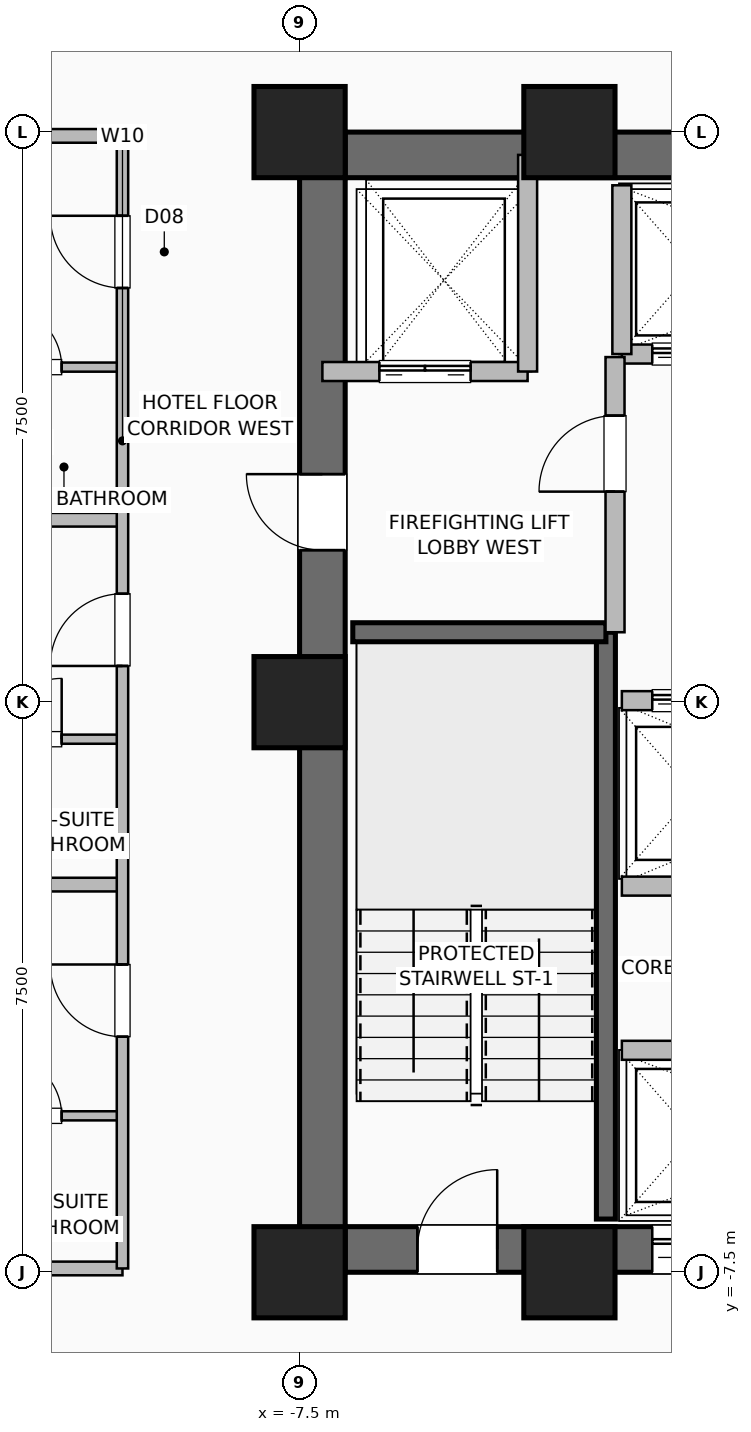
"""IFC4 building model, lengths in metres.
Left out: names, types, materials, properties, quantities, classifications, styles, units other than length and angle.
Written with IfcOpenShell. Run it as: python <this file> out.ifc"""

import sys

from ifc_helpers import new_model, si_unit, direction, frame, frame_2d, origin, origin_2d, place, context, subcontext, project, spatial, rectangle, hollow_rectangle, extrude, element, fill, save


model = new_model("IFC4")
c1 = context("Model", 3, precision=1e-05, world=origin(), true_north=direction((0.0, 1.0)))
c2 = subcontext(c1, "Body", "Model", "MODEL_VIEW")
j1 = project(units=[si_unit("LENGTHUNIT", "METRE"), si_unit("PLANEANGLEUNIT", "RADIAN")], contexts=[c1])
p1 = place(None, origin())
s1 = spatial("IfcSite", under=j1, at=p1, CompositionType="ELEMENT")
p2 = place(p1, origin())
s2 = spatial("IfcBuilding", under=s1, at=p2, CompositionType="ELEMENT")
p3 = place(p2, frame((0.0, 0.0, 30.5)))
s3 = spatial("IfcBuildingStorey", under=s2, at=p3, CompositionType="ELEMENT", Elevation=30.5)
for number, where, z_axis, x_axis in (
    (1, (-7.5, -7.5, 0.0), (0.0, 0.0, 1.0), (1.0, 0.0, 0.0)),
    (2, (-3.95, -7.5, 0.0), (0.0, 0.0, 1.0), (1.0, 0.0, 0.0)),
    (3, (-3.95, 7.5, 0.0), (0.0, 0.0, 1.0), (1.0, 0.0, 0.0)),
    (4, (-7.5, 7.5, 0.0), (0.0, 0.0, 1.0), (1.0, 0.0, 0.0)),
    (5, (-7.5, 0.0, 0.0), (0.0, 0.0, 1.0), (1.0, 0.0, 0.0)),
):
    element("IfcColumn", number, at=place(p3, frame(where, z_axis=z_axis, x_axis=x_axis)), inside=s3, PredefinedType="COLUMN", context=c2, shape_type="SweptSolid", body=[
        extrude(hollow_rectangle(XDim=1.2, YDim=1.2, WallThickness=0.055, at=origin_2d()), origin(), (0.0, 0.0, 1.0), 3.5),
    ])
p4 = place(p3, frame((-7.5, -7.2, 0.0), z_axis=(0.0, 0.0, 1.0), x_axis=(1.0, 0.0, 0.0)))
e6 = element("IfcWall", 6, at=p4, inside=s3, PredefinedType="SHEAR", context=c2, shape_type="SweptSolid", body=[
    extrude(rectangle(XDim=15.0, YDim=0.6, at=frame_2d((7.5, 0.0))), origin(), (0.0, 0.0, 1.0), 3.25),
])
p5 = place(p4, frame((1.55, 0.0, 0.0)))
e7 = element("IfcOpeningElement", 7, at=p5, cuts=e6, PredefinedType="OPENING", context=c2, shape_type="SweptSolid", body=[
    extrude(rectangle(XDim=1.05, YDim=2.08, at=frame_2d((0.525, 1.04))), frame((0.0, 0.31, 0.0), z_axis=(0.0, -1.0, 0.0), x_axis=(1.0, 0.0, 0.0)), (0.0, 0.0, 1.0), 0.62),
])
p6 = place(p4, frame((12.4, 0.0, 0.0)))
e8 = element("IfcOpeningElement", 8, at=p6, cuts=e6, PredefinedType="OPENING", context=c2, shape_type="SweptSolid", body=[
    extrude(rectangle(XDim=1.05, YDim=2.08, at=frame_2d((0.525, 1.04))), frame((0.0, 0.31, 0.0), z_axis=(0.0, -1.0, 0.0), x_axis=(1.0, 0.0, 0.0)), (0.0, 0.0, 1.0), 0.62),
])
p7 = place(p4, frame((4.64, 0.0, 0.0)))
e9 = element("IfcOpeningElement", 9, at=p7, cuts=e6, PredefinedType="OPENING", context=c2, shape_type="SweptSolid", body=[
    extrude(rectangle(XDim=1.1, YDim=2.2, at=frame_2d((0.55, 1.1))), frame((0.0, 0.31, 0.0), z_axis=(0.0, -1.0, 0.0), x_axis=(1.0, 0.0, 0.0)), (0.0, 0.0, 1.0), 0.62),
])
p8 = place(p4, frame((6.52, 0.0, 0.0)))
e10 = element("IfcOpeningElement", 10, at=p8, cuts=e6, PredefinedType="OPENING", context=c2, shape_type="SweptSolid", body=[
    extrude(rectangle(XDim=1.1, YDim=2.2, at=frame_2d((0.55, 1.1))), frame((0.0, 0.31, 0.0), z_axis=(0.0, -1.0, 0.0), x_axis=(1.0, 0.0, 0.0)), (0.0, 0.0, 1.0), 0.62),
])
p9 = place(p4, frame((8.4, 0.0, 0.0)))
e11 = element("IfcOpeningElement", 11, at=p9, cuts=e6, PredefinedType="OPENING", context=c2, shape_type="SweptSolid", body=[
    extrude(rectangle(XDim=1.1, YDim=2.2, at=frame_2d((0.55, 1.1))), frame((0.0, 0.31, 0.0), z_axis=(0.0, -1.0, 0.0), x_axis=(1.0, 0.0, 0.0)), (0.0, 0.0, 1.0), 0.62),
])
p10 = place(p3, frame((-7.5, 7.2, 0.0), z_axis=(0.0, 0.0, 1.0), x_axis=(1.0, 0.0, 0.0)))
e12 = element("IfcWall", 12, at=p10, inside=s3, PredefinedType="SHEAR", context=c2, shape_type="SweptSolid", body=[
    extrude(rectangle(XDim=15.0, YDim=0.6, at=frame_2d((7.5, 0.0))), origin(), (0.0, 0.0, 1.0), 3.25),
])
p11 = place(p3, frame((-7.2, -7.5, 0.0), z_axis=(0.0, 0.0, 1.0), x_axis=(0.0, 1.0, 0.0)))
e13 = element("IfcWall", 13, at=p11, inside=s3, PredefinedType="SHEAR", context=c2, shape_type="SweptSolid", body=[
    extrude(rectangle(XDim=15.0, YDim=0.6, at=frame_2d((7.5, 0.0))), origin(), (0.0, 0.0, 1.0), 3.25),
])
p12 = place(p11, frame((9.5, 0.0, 0.0)))
e14 = element("IfcOpeningElement", 14, at=p12, cuts=e13, PredefinedType="OPENING", context=c2, shape_type="SweptSolid", body=[
    extrude(rectangle(XDim=1.0, YDim=2.08, at=frame_2d((0.5, 1.04))), frame((0.0, 0.31, 0.0), z_axis=(0.0, -1.0, 0.0), x_axis=(1.0, 0.0, 0.0)), (0.0, 0.0, 1.0), 0.62),
])
p13 = place(p3, frame((-3.47, -6.8, 0.0), z_axis=(0.0, 0.0, 1.0), x_axis=(0.0, 1.0, 0.0)))
e15 = element("IfcWall", 15, at=p13, inside=s3, PredefinedType="SHEAR", context=c2, shape_type="SweptSolid", body=[
    extrude(rectangle(XDim=7.72, YDim=0.25, at=frame_2d((3.86, 0.0))), origin(), (0.0, 0.0, 1.0), 3.25),
])
p14 = place(p3, frame((-6.8, 0.92, 0.0), z_axis=(0.0, 0.0, 1.0), x_axis=(1.0, 0.0, 0.0)))
e16 = element("IfcWall", 16, at=p14, inside=s3, PredefinedType="SHEAR", context=c2, shape_type="SweptSolid", body=[
    extrude(rectangle(XDim=3.33, YDim=0.25, at=frame_2d((1.665, 0.0))), origin(), (0.0, 0.0, 1.0), 3.25),
])
p15 = place(p3, frame((-3.26, -4.58, 0.0), z_axis=(0.0, 0.0, 1.0), x_axis=(1.0, 0.0, 0.0)))
e17 = element("IfcWall", 17, at=p15, inside=s3, PredefinedType="SHEAR", context=c2, shape_type="SweptSolid", body=[
    extrude(rectangle(XDim=5.64, YDim=0.25, at=frame_2d((2.82, 0.0))), origin(), (0.0, 0.0, 1.0), 3.25),
])
p16 = place(p3, frame((-3.26, 0.02, 0.0), z_axis=(0.0, 0.0, 1.0), x_axis=(1.0, 0.0, 0.0)))
e18 = element("IfcWall", 18, at=p16, inside=s3, PredefinedType="SHEAR", context=c2, shape_type="SweptSolid", body=[
    extrude(rectangle(XDim=5.64, YDim=0.25, at=frame_2d((2.82, 0.0))), origin(), (0.0, 0.0, 1.0), 3.25),
])
p17 = place(p16, frame((0.4, 0.0, 0.0)))
e19 = element("IfcOpeningElement", 19, at=p17, cuts=e18, PredefinedType="OPENING", context=c2, shape_type="SweptSolid", body=[
    extrude(rectangle(XDim=1.1, YDim=2.2, at=frame_2d((0.55, 1.1))), frame((0.0, 0.135, 0.0), z_axis=(0.0, -1.0, 0.0), x_axis=(1.0, 0.0, 0.0)), (0.0, 0.0, 1.0), 0.27),
])
p18 = place(p16, frame((2.28, 0.0, 0.0)))
e20 = element("IfcOpeningElement", 20, at=p18, cuts=e18, PredefinedType="OPENING", context=c2, shape_type="SweptSolid", body=[
    extrude(rectangle(XDim=1.1, YDim=2.2, at=frame_2d((0.55, 1.1))), frame((0.0, 0.135, 0.0), z_axis=(0.0, -1.0, 0.0), x_axis=(1.0, 0.0, 0.0)), (0.0, 0.0, 1.0), 0.27),
])
p19 = place(p16, frame((4.16, 0.0, 0.0)))
e21 = element("IfcOpeningElement", 21, at=p19, cuts=e18, PredefinedType="OPENING", context=c2, shape_type="SweptSolid", body=[
    extrude(rectangle(XDim=1.1, YDim=2.2, at=frame_2d((0.55, 1.1))), frame((0.0, 0.135, 0.0), z_axis=(0.0, -1.0, 0.0), x_axis=(1.0, 0.0, 0.0)), (0.0, 0.0, 1.0), 0.27),
])
p20 = place(p3, frame((-3.26, -2.42, 0.0), z_axis=(0.0, 0.0, 1.0), x_axis=(1.0, 0.0, 0.0)))
e22 = element("IfcWall", 22, at=p20, inside=s3, PredefinedType="SHEAR", context=c2, shape_type="SweptSolid", body=[
    extrude(rectangle(XDim=5.64, YDim=0.25, at=frame_2d((2.82, 0.0))), origin(), (0.0, 0.0, 1.0), 3.25),
])
p21 = place(p3, frame((-3.26, 4.58, 0.0), z_axis=(0.0, 0.0, 1.0), x_axis=(1.0, 0.0, 0.0)))
e23 = element("IfcWall", 23, at=p21, inside=s3, PredefinedType="SHEAR", context=c2, shape_type="SweptSolid", body=[
    extrude(rectangle(XDim=5.64, YDim=0.25, at=frame_2d((2.82, 0.0))), origin(), (0.0, 0.0, 1.0), 3.25),
])
p22 = place(p21, frame((0.4, 0.0, 0.0)))
e24 = element("IfcOpeningElement", 24, at=p22, cuts=e23, PredefinedType="OPENING", context=c2, shape_type="SweptSolid", body=[
    extrude(rectangle(XDim=1.1, YDim=2.2, at=frame_2d((0.55, 1.1))), frame((0.0, 0.135, 0.0), z_axis=(0.0, -1.0, 0.0), x_axis=(1.0, 0.0, 0.0)), (0.0, 0.0, 1.0), 0.27),
])
p23 = place(p21, frame((2.28, 0.0, 0.0)))
e25 = element("IfcOpeningElement", 25, at=p23, cuts=e23, PredefinedType="OPENING", context=c2, shape_type="SweptSolid", body=[
    extrude(rectangle(XDim=1.1, YDim=2.2, at=frame_2d((0.55, 1.1))), frame((0.0, 0.135, 0.0), z_axis=(0.0, -1.0, 0.0), x_axis=(1.0, 0.0, 0.0)), (0.0, 0.0, 1.0), 0.27),
])
p24 = place(p21, frame((4.16, 0.0, 0.0)))
e26 = element("IfcOpeningElement", 26, at=p24, cuts=e23, PredefinedType="OPENING", context=c2, shape_type="SweptSolid", body=[
    extrude(rectangle(XDim=1.1, YDim=2.2, at=frame_2d((0.55, 1.1))), frame((0.0, 0.135, 0.0), z_axis=(0.0, -1.0, 0.0), x_axis=(1.0, 0.0, 0.0)), (0.0, 0.0, 1.0), 0.27),
])
p25 = place(p3, frame((-3.26, 4.58, 0.0), z_axis=(0.0, 0.0, 1.0), x_axis=(0.0, 1.0, 0.0)))
e27 = element("IfcWall", 27, at=p25, inside=s3, PredefinedType="SHEAR", context=c2, shape_type="SweptSolid", body=[
    extrude(rectangle(XDim=2.22, YDim=0.25, at=frame_2d((1.11, 0.0))), origin(), (0.0, 0.0, 1.0), 3.25),
])
p26 = place(p3, frame((-7.2, 4.35, 0.0), z_axis=(0.0, 0.0, 1.0), x_axis=(1.0, 0.0, 0.0)))
e28 = element("IfcWall", 28, at=p26, inside=s3, PredefinedType="SHEAR", context=c2, shape_type="SweptSolid", body=[
    extrude(rectangle(XDim=2.7, YDim=0.25, at=frame_2d((1.35, 0.0))), origin(), (0.0, 0.0, 1.0), 3.25),
])
p27 = place(p26, frame((0.75, 0.0, 0.0)))
e29 = element("IfcOpeningElement", 29, at=p27, cuts=e28, PredefinedType="OPENING", context=c2, shape_type="SweptSolid", body=[
    extrude(rectangle(XDim=1.2, YDim=2.2, at=frame_2d((0.6, 1.1))), frame((0.0, 0.135, 0.0), z_axis=(0.0, -1.0, 0.0), x_axis=(1.0, 0.0, 0.0)), (0.0, 0.0, 1.0), 0.27),
])
p28 = place(p3, frame((-4.5, 4.35, 0.0), z_axis=(0.0, 0.0, 1.0), x_axis=(0.0, 1.0, 0.0)))
e30 = element("IfcWall", 30, at=p28, inside=s3, PredefinedType="SHEAR", context=c2, shape_type="SweptSolid", body=[
    extrude(rectangle(XDim=2.85, YDim=0.25, at=frame_2d((1.425, 0.0))), origin(), (0.0, 0.0, 1.0), 3.25),
])
p29 = place(p3, frame((-3.35, 0.92, 0.0), z_axis=(0.0, 0.0, 1.0), x_axis=(0.0, 1.0, 0.0)))
e31 = element("IfcWall", 31, at=p29, inside=s3, PredefinedType="SHEAR", context=c2, shape_type="SweptSolid", body=[
    extrude(rectangle(XDim=3.62, YDim=0.25, at=frame_2d((1.81, 0.0))), origin(), (0.0, 0.0, 1.0), 3.25),
])
p30 = place(p29, frame((1.85, 0.0, 0.0)))
e32 = element("IfcOpeningElement", 32, at=p30, cuts=e31, PredefinedType="OPENING", context=c2, shape_type="SweptSolid", body=[
    extrude(rectangle(XDim=1.0, YDim=2.08, at=frame_2d((0.5, 1.04))), frame((0.0, 0.135, 0.0), z_axis=(0.0, -1.0, 0.0), x_axis=(1.0, 0.0, 0.0)), (0.0, 0.0, 1.0), 0.27),
])
p31 = place(p3, frame((-12.08, -5.442, 0.0), z_axis=(0.0, 0.0, 1.0), x_axis=(1.0, 0.0, 0.0)))
e33 = element("IfcWall", 33, at=p31, inside=s3, PredefinedType="PLUMBINGWALL", context=c2, shape_type="SweptSolid", body=[
    extrude(rectangle(XDim=2.25, YDim=0.12, at=frame_2d((1.125, 0.0))), origin(), (0.0, 0.0, 1.0), 3.25),
])
p32 = place(p31, frame((0.65, 0.0, 0.0)))
e34 = element("IfcOpeningElement", 34, at=p32, cuts=e33, PredefinedType="OPENING", context=c2, shape_type="SweptSolid", body=[
    extrude(rectangle(XDim=0.8, YDim=2.05, at=frame_2d((0.4, 1.025))), frame((0.0, 0.07, 0.0), z_axis=(0.0, -1.0, 0.0), x_axis=(1.0, 0.0, 0.0)), (0.0, 0.0, 1.0), 0.14),
])
p33 = place(p3, frame((-12.08, -0.487, 0.0), z_axis=(0.0, 0.0, 1.0), x_axis=(1.0, 0.0, 0.0)))
e35 = element("IfcWall", 35, at=p33, inside=s3, PredefinedType="PLUMBINGWALL", context=c2, shape_type="SweptSolid", body=[
    extrude(rectangle(XDim=2.25, YDim=0.12, at=frame_2d((1.125, 0.0))), origin(), (0.0, 0.0, 1.0), 3.25),
])
p34 = place(p33, frame((0.65, 0.0, 0.0)))
e36 = element("IfcOpeningElement", 36, at=p34, cuts=e35, PredefinedType="OPENING", context=c2, shape_type="SweptSolid", body=[
    extrude(rectangle(XDim=0.8, YDim=2.05, at=frame_2d((0.4, 1.025))), frame((0.0, 0.07, 0.0), z_axis=(0.0, -1.0, 0.0), x_axis=(1.0, 0.0, 0.0)), (0.0, 0.0, 1.0), 0.14),
])
p35 = place(p3, frame((-12.08, 4.408, 0.0), z_axis=(0.0, 0.0, 1.0), x_axis=(1.0, 0.0, 0.0)))
e37 = element("IfcWall", 37, at=p35, inside=s3, PredefinedType="PLUMBINGWALL", context=c2, shape_type="SweptSolid", body=[
    extrude(rectangle(XDim=2.25, YDim=0.12, at=frame_2d((1.125, 0.0))), origin(), (0.0, 0.0, 1.0), 3.25),
])
p36 = place(p35, frame((0.65, 0.0, 0.0)))
e38 = element("IfcOpeningElement", 38, at=p36, cuts=e37, PredefinedType="OPENING", context=c2, shape_type="SweptSolid", body=[
    extrude(rectangle(XDim=0.8, YDim=2.05, at=frame_2d((0.4, 1.025))), frame((0.0, 0.07, 0.0), z_axis=(0.0, -1.0, 0.0), x_axis=(1.0, 0.0, 0.0)), (0.0, 0.0, 1.0), 0.14),
])
for number, where, z_axis, x_axis in (
    (39, (-23.82, -7.45, 0.0), (0.0, 0.0, 1.0), (1.0, 0.0, 0.0)),
    (40, (-23.82, -2.4, 0.0), (0.0, 0.0, 1.0), (1.0, 0.0, 0.0)),
    (41, (-23.82, 2.4, 0.0), (0.0, 0.0, 1.0), (1.0, 0.0, 0.0)),
    (42, (-23.82, 7.45, 0.0), (0.0, 0.0, 1.0), (1.0, 0.0, 0.0)),
):
    element("IfcWall", number, at=place(p3, frame(where, z_axis=z_axis, x_axis=x_axis)), inside=s3, PredefinedType="PARTITIONING", context=c2, shape_type="SweptSolid", body=[
        extrude(rectangle(XDim=13.99, YDim=0.18, at=frame_2d((6.995, 0.0))), origin(), (0.0, 0.0, 1.0), 3.25),
    ])
p37 = place(p3, frame((-9.83, -7.45, 0.0), z_axis=(0.0, 0.0, 1.0), x_axis=(0.0, 1.0, 0.0)))
e43 = element("IfcWall", 43, at=p37, inside=s3, PredefinedType="PARTITIONING", context=c2, shape_type="SweptSolid", body=[
    extrude(rectangle(XDim=14.9, YDim=0.15, at=frame_2d((7.45, 0.0))), origin(), (0.0, 0.0, 1.0), 3.25),
])
p38 = place(p37, frame((3.049, 0.0, 0.0)))
e44 = element("IfcOpeningElement", 44, at=p38, cuts=e43, PredefinedType="OPENING", context=c2, shape_type="SweptSolid", body=[
    extrude(rectangle(XDim=0.95, YDim=2.08, at=frame_2d((0.475, 1.04))), frame((0.0, 0.085, 0.0), z_axis=(0.0, -1.0, 0.0), x_axis=(1.0, 0.0, 0.0)), (0.0, 0.0, 1.0), 0.17),
])
p39 = place(p37, frame((7.927, 0.0, 0.0)))
e45 = element("IfcOpeningElement", 45, at=p39, cuts=e43, PredefinedType="OPENING", context=c2, shape_type="SweptSolid", body=[
    extrude(rectangle(XDim=0.95, YDim=2.08, at=frame_2d((0.475, 1.04))), frame((0.0, 0.085, 0.0), z_axis=(0.0, -1.0, 0.0), x_axis=(1.0, 0.0, 0.0)), (0.0, 0.0, 1.0), 0.17),
])
p40 = place(p37, frame((12.899, 0.0, 0.0)))
e46 = element("IfcOpeningElement", 46, at=p40, cuts=e43, PredefinedType="OPENING", context=c2, shape_type="SweptSolid", body=[
    extrude(rectangle(XDim=0.95, YDim=2.08, at=frame_2d((0.475, 1.04))), frame((0.0, 0.085, 0.0), z_axis=(0.0, -1.0, 0.0), x_axis=(1.0, 0.0, 0.0)), (0.0, 0.0, 1.0), 0.17),
])
p41 = place(p5, origin())
e47 = element("IfcDoor", 47, at=p41, inside=s3, OperationType="SINGLE_SWING_RIGHT", PredefinedType="DOOR", context=c2, shape_type="SweptSolid", body=[
    extrude(rectangle(XDim=1.05, YDim=2.08, at=frame_2d((0.525, 1.04))), frame((0.0, 0.025, 0.0), z_axis=(0.0, -1.0, 0.0), x_axis=(1.0, 0.0, 0.0)), (0.0, 0.0, 1.0), 0.05),
])
fill(e7, e47)
p42 = place(p12, origin())
e48 = element("IfcDoor", 48, at=p42, inside=s3, OperationType="SINGLE_SWING_RIGHT", PredefinedType="DOOR", context=c2, shape_type="SweptSolid", body=[
    extrude(rectangle(XDim=1.0, YDim=2.08, at=frame_2d((0.5, 1.04))), frame((0.0, 0.025, 0.0), z_axis=(0.0, -1.0, 0.0), x_axis=(1.0, 0.0, 0.0)), (0.0, 0.0, 1.0), 0.05),
])
fill(e14, e48)
p43 = place(p7, origin())
e49 = element("IfcDoor", 49, at=p43, inside=s3, OperationType="DOUBLE_DOOR_SLIDING", PredefinedType="DOOR", context=c2, shape_type="SweptSolid", body=[
    extrude(rectangle(XDim=1.1, YDim=2.2, at=frame_2d((0.55, 1.1))), frame((0.0, 0.025, 0.0), z_axis=(0.0, -1.0, 0.0), x_axis=(1.0, 0.0, 0.0)), (0.0, 0.0, 1.0), 0.05),
])
fill(e9, e49)
p44 = place(p17, origin())
e50 = element("IfcDoor", 50, at=p44, inside=s3, OperationType="DOUBLE_DOOR_SLIDING", PredefinedType="DOOR", context=c2, shape_type="SweptSolid", body=[
    extrude(rectangle(XDim=1.1, YDim=2.2, at=frame_2d((0.55, 1.1))), frame((0.0, 0.025, 0.0), z_axis=(0.0, -1.0, 0.0), x_axis=(1.0, 0.0, 0.0)), (0.0, 0.0, 1.0), 0.05),
])
fill(e19, e50)
p45 = place(p22, origin())
e51 = element("IfcDoor", 51, at=p45, inside=s3, OperationType="DOUBLE_DOOR_SLIDING", PredefinedType="DOOR", context=c2, shape_type="SweptSolid", body=[
    extrude(rectangle(XDim=1.1, YDim=2.2, at=frame_2d((0.55, 1.1))), frame((0.0, 0.025, 0.0), z_axis=(0.0, -1.0, 0.0), x_axis=(1.0, 0.0, 0.0)), (0.0, 0.0, 1.0), 0.05),
])
fill(e24, e51)
p46 = place(p27, origin())
e52 = element("IfcDoor", 52, at=p46, inside=s3, OperationType="DOUBLE_DOOR_SLIDING", PredefinedType="DOOR", context=c2, shape_type="SweptSolid", body=[
    extrude(rectangle(XDim=1.2, YDim=2.2, at=frame_2d((0.6, 1.1))), frame((0.0, 0.025, 0.0), z_axis=(0.0, -1.0, 0.0), x_axis=(1.0, 0.0, 0.0)), (0.0, 0.0, 1.0), 0.05),
])
fill(e29, e52)
p47 = place(p30, origin())
e53 = element("IfcDoor", 53, at=p47, inside=s3, OperationType="SINGLE_SWING_LEFT", PredefinedType="DOOR", context=c2, shape_type="SweptSolid", body=[
    extrude(rectangle(XDim=1.0, YDim=2.08, at=frame_2d((0.5, 1.04))), frame((0.0, 0.025, 0.0), z_axis=(0.0, -1.0, 0.0), x_axis=(1.0, 0.0, 0.0)), (0.0, 0.0, 1.0), 0.05),
])
fill(e32, e53)
p48 = place(p32, origin())
e54 = element("IfcDoor", 54, at=p48, inside=s3, OperationType="SINGLE_SWING_LEFT", PredefinedType="DOOR", context=c2, shape_type="SweptSolid", body=[
    extrude(rectangle(XDim=0.8, YDim=2.05, at=frame_2d((0.4, 1.025))), frame((0.0, 0.025, 0.0), z_axis=(0.0, -1.0, 0.0), x_axis=(1.0, 0.0, 0.0)), (0.0, 0.0, 1.0), 0.05),
])
fill(e34, e54)
p49 = place(p34, origin())
e55 = element("IfcDoor", 55, at=p49, inside=s3, OperationType="SINGLE_SWING_RIGHT", PredefinedType="DOOR", context=c2, shape_type="SweptSolid", body=[
    extrude(rectangle(XDim=0.8, YDim=2.05, at=frame_2d((0.4, 1.025))), frame((0.0, 0.025, 0.0), z_axis=(0.0, -1.0, 0.0), x_axis=(1.0, 0.0, 0.0)), (0.0, 0.0, 1.0), 0.05),
])
fill(e36, e55)
p50 = place(p36, origin())
e56 = element("IfcDoor", 56, at=p50, inside=s3, OperationType="SINGLE_SWING_LEFT", PredefinedType="DOOR", context=c2, shape_type="SweptSolid", body=[
    extrude(rectangle(XDim=0.8, YDim=2.05, at=frame_2d((0.4, 1.025))), frame((0.0, 0.025, 0.0), z_axis=(0.0, -1.0, 0.0), x_axis=(1.0, 0.0, 0.0)), (0.0, 0.0, 1.0), 0.05),
])
fill(e38, e56)
p51 = place(p38, origin())
e57 = element("IfcDoor", 57, at=p51, inside=s3, OperationType="SINGLE_SWING_RIGHT", PredefinedType="DOOR", context=c2, shape_type="SweptSolid", body=[
    extrude(rectangle(XDim=0.95, YDim=2.08, at=frame_2d((0.475, 1.04))), frame((0.0, 0.025, 0.0), z_axis=(0.0, -1.0, 0.0), x_axis=(1.0, 0.0, 0.0)), (0.0, 0.0, 1.0), 0.05),
])
fill(e44, e57)
p52 = place(p39, origin())
e58 = element("IfcDoor", 58, at=p52, inside=s3, OperationType="SINGLE_SWING_LEFT", PredefinedType="DOOR", context=c2, shape_type="SweptSolid", body=[
    extrude(rectangle(XDim=0.95, YDim=2.08, at=frame_2d((0.475, 1.04))), frame((0.0, 0.025, 0.0), z_axis=(0.0, -1.0, 0.0), x_axis=(1.0, 0.0, 0.0)), (0.0, 0.0, 1.0), 0.05),
])
fill(e45, e58)
p53 = place(p40, origin())
e59 = element("IfcDoor", 59, at=p53, inside=s3, OperationType="SINGLE_SWING_RIGHT", PredefinedType="DOOR", context=c2, shape_type="SweptSolid", body=[
    extrude(rectangle(XDim=0.95, YDim=2.08, at=frame_2d((0.475, 1.04))), frame((0.0, 0.025, 0.0), z_axis=(0.0, -1.0, 0.0), x_axis=(1.0, 0.0, 0.0)), (0.0, 0.0, 1.0), 0.05),
])
fill(e46, e59)
save(model, sys.argv[1])
